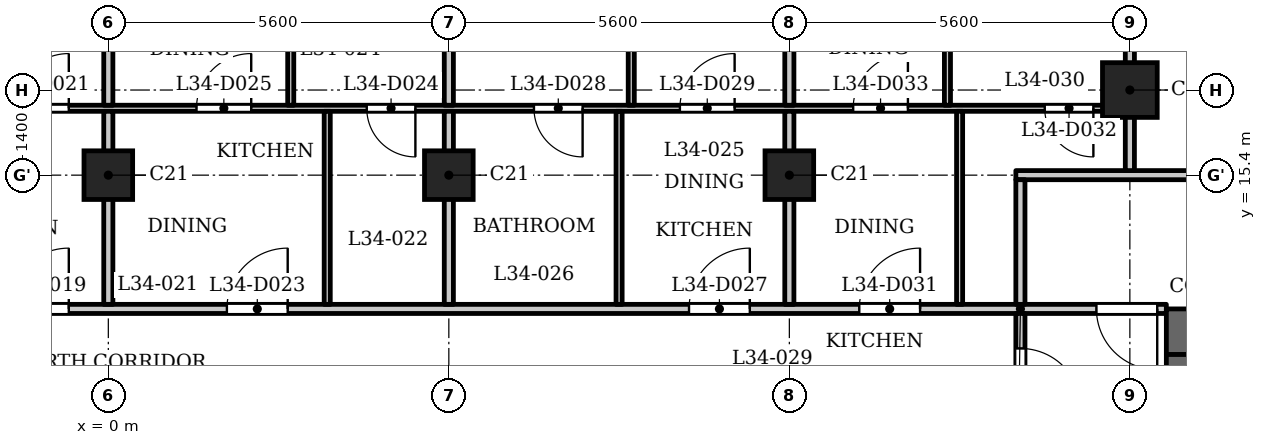
"""IFC4 building model, lengths in metres.
Left out: names, types, materials, properties, quantities, classifications, styles, units other than length and angle.
Written with IfcOpenShell. Run it as: python <this file> out.ifc"""

import sys

from ifc_helpers import new_model, si_unit, direction, frame, frame_2d, origin, origin_2d, place, context, subcontext, project, spatial, rectangle, extrude, element, fill, save


model = new_model("IFC4")
c1 = context("Model", 3, precision=1e-05, world=origin(), true_north=direction((0.0, 1.0)))
c2 = subcontext(c1, "Body", "Model", "MODEL_VIEW")
j1 = project(units=[si_unit("LENGTHUNIT", "METRE"), si_unit("PLANEANGLEUNIT", "RADIAN")], contexts=[c1])
p1 = place(None, origin())
s1 = spatial("IfcSite", under=j1, at=p1, CompositionType="ELEMENT")
p2 = place(p1, origin())
s2 = spatial("IfcBuilding", under=s1, at=p2, CompositionType="ELEMENT")
p3 = place(p2, frame((0.0, 0.0, 136.1)))
s3 = spatial("IfcBuildingStorey", under=s2, at=p3, CompositionType="ELEMENT", Elevation=136.1)
p4 = place(p3, frame((16.8, 16.8, 0.0), z_axis=(0.0, 0.0, 1.0), x_axis=(1.0, 0.0, 0.0)))
e1 = element("IfcColumn", 1, at=p4, inside=s3, PredefinedType="COLUMN", context=c2, shape_type="SweptSolid", body=[
    extrude(rectangle(XDim=0.9, YDim=0.9, at=origin_2d()), origin(), (0.0, 0.0, 1.0), 3.5),
])
for number, where, z_axis, x_axis in (
    (2, (0.0, 15.4, 0.0), (0.0, 0.0, 1.0), (1.0, 0.0, 0.0)),
    (3, (5.6, 15.4, 0.0), (0.0, 0.0, 1.0), (1.0, 0.0, 0.0)),
    (4, (11.2, 15.4, 0.0), (0.0, 0.0, 1.0), (1.0, 0.0, 0.0)),
):
    element("IfcColumn", number, at=place(p3, frame(where, z_axis=z_axis, x_axis=x_axis)), inside=s3, PredefinedType="COLUMN", context=c2, shape_type="SweptSolid", body=[
        extrude(rectangle(XDim=0.8, YDim=0.8, at=origin_2d()), origin(), (0.0, 0.0, 1.0), 3.5),
    ])
p5 = place(p3, frame((17.4, 12.825, 0.0), z_axis=(0.0, 0.0, 1.0), x_axis=(1.0, 0.0, 0.0)))
e5 = element("IfcWall", 5, at=p5, inside=s3, PredefinedType="SHEAR", context=c2, shape_type="SweptSolid", body=[
    extrude(rectangle(XDim=10.4, YDim=0.75, at=frame_2d((5.2, 0.0))), origin(), (0.0, 0.0, 1.0), 3.2),
])
p6 = place(p3, frame((17.6, -12.45, 0.0), z_axis=(0.0, 0.0, 1.0), x_axis=(0.0, 1.0, 0.0)))
e6 = element("IfcWall", 6, at=p6, inside=s3, PredefinedType="SHEAR", context=c2, shape_type="SweptSolid", body=[
    extrude(rectangle(XDim=24.9, YDim=0.4, at=frame_2d((12.45, 0.0))), origin(), (0.0, 0.0, 1.0), 3.2),
])
p7 = place(p6, frame((8.65, 0.0, 0.0)))
e7 = element("IfcOpeningElement", 7, at=p7, cuts=e6, PredefinedType="OPENING", context=c2, shape_type="SweptSolid", body=[
    extrude(rectangle(XDim=0.9, YDim=2.1, at=frame_2d((0.45, 1.05))), frame((0.0, 0.21, 0.0), z_axis=(0.0, -1.0, 0.0), x_axis=(1.0, 0.0, 0.0)), (0.0, 0.0, 1.0), 0.42),
])
p8 = place(p6, frame((15.6, 0.0, 0.0)))
e8 = element("IfcOpeningElement", 8, at=p8, cuts=e6, PredefinedType="OPENING", context=c2, shape_type="SweptSolid", body=[
    extrude(rectangle(XDim=1.1, YDim=2.1, at=frame_2d((0.55, 1.05))), frame((0.0, 0.21, 0.0), z_axis=(0.0, -1.0, 0.0), x_axis=(1.0, 0.0, 0.0)), (0.0, 0.0, 1.0), 0.42),
])
p9 = place(p6, frame((18.0, 0.0, 0.0)))
e9 = element("IfcOpeningElement", 9, at=p9, cuts=e6, PredefinedType="OPENING", context=c2, shape_type="SweptSolid", body=[
    extrude(rectangle(XDim=1.1, YDim=2.1, at=frame_2d((0.55, 1.05))), frame((0.0, 0.21, 0.0), z_axis=(0.0, -1.0, 0.0), x_axis=(1.0, 0.0, 0.0)), (0.0, 0.0, 1.0), 0.42),
])
p10 = place(p6, frame((23.025, 0.0, 0.0)))
e10 = element("IfcOpeningElement", 10, at=p10, cuts=e6, PredefinedType="OPENING", context=c2, shape_type="SweptSolid", body=[
    extrude(rectangle(XDim=1.1, YDim=2.1, at=frame_2d((0.55, 1.05))), frame((0.0, 0.21, 0.0), z_axis=(0.0, -1.0, 0.0), x_axis=(1.0, 0.0, 0.0)), (0.0, 0.0, 1.0), 0.42),
])
p11 = place(p6, frame((0.775, 0.0, 0.0)))
e11 = element("IfcOpeningElement", 11, at=p11, cuts=e6, PredefinedType="OPENING", context=c2, shape_type="SweptSolid", body=[
    extrude(rectangle(XDim=1.1, YDim=2.1, at=frame_2d((0.55, 1.05))), frame((0.0, 0.21, 0.0), z_axis=(0.0, -1.0, 0.0), x_axis=(1.0, 0.0, 0.0)), (0.0, 0.0, 1.0), 0.42),
])
p12 = place(p6, frame((12.925, 0.0, 0.0)))
e12 = element("IfcOpeningElement", 12, at=p12, cuts=e6, PredefinedType="OPENING", context=c2, shape_type="SweptSolid", body=[
    extrude(rectangle(XDim=1.8, YDim=2.1, at=frame_2d((0.9, 1.05))), frame((0.0, 0.21, 0.0), z_axis=(0.0, -1.0, 0.0), x_axis=(1.0, 0.0, 0.0)), (0.0, 0.0, 1.0), 0.42),
])
p13 = place(p3, frame((-17.4, 13.2, 0.0), z_axis=(0.0, 0.0, 1.0), x_axis=(1.0, 0.0, 0.0)))
e13 = element("IfcWall", 13, at=p13, inside=s3, PredefinedType="PARTITIONING", context=c2, shape_type="SweptSolid", body=[
    extrude(rectangle(XDim=34.8, YDim=0.15, at=frame_2d((17.4, 0.0))), origin(), (0.0, 0.0, 1.0), 3.2),
])
p14 = place(p13, frame((0.25, 0.0, 0.0)))
e14 = element("IfcOpeningElement", 14, at=p14, cuts=e13, PredefinedType="OPENING", context=c2, shape_type="SweptSolid", body=[
    extrude(rectangle(XDim=1.0, YDim=2.1, at=frame_2d((0.5, 1.05))), frame((0.0, 0.085, 0.0), z_axis=(0.0, -1.0, 0.0), x_axis=(1.0, 0.0, 0.0)), (0.0, 0.0, 1.0), 0.17),
])
p15 = place(p13, frame((33.65, 0.0, 0.0)))
e15 = element("IfcOpeningElement", 15, at=p15, cuts=e13, PredefinedType="OPENING", context=c2, shape_type="SweptSolid", body=[
    extrude(rectangle(XDim=1.0, YDim=2.1, at=frame_2d((0.5, 1.05))), frame((0.0, 0.085, 0.0), z_axis=(0.0, -1.0, 0.0), x_axis=(1.0, 0.0, 0.0)), (0.0, 0.0, 1.0), 0.17),
])
p16 = place(p13, frame((15.75, 0.0, 0.0)))
e16 = element("IfcOpeningElement", 16, at=p16, cuts=e13, PredefinedType="OPENING", context=c2, shape_type="SweptSolid", body=[
    extrude(rectangle(XDim=1.0, YDim=2.1, at=frame_2d((0.5, 1.05))), frame((0.0, 0.085, 0.0), z_axis=(0.0, -1.0, 0.0), x_axis=(1.0, 0.0, 0.0)), (0.0, 0.0, 1.0), 0.17),
])
p17 = place(p13, frame((19.35, 0.0, 0.0)))
e17 = element("IfcOpeningElement", 17, at=p17, cuts=e13, PredefinedType="OPENING", context=c2, shape_type="SweptSolid", body=[
    extrude(rectangle(XDim=1.0, YDim=2.1, at=frame_2d((0.5, 1.05))), frame((0.0, 0.085, 0.0), z_axis=(0.0, -1.0, 0.0), x_axis=(1.0, 0.0, 0.0)), (0.0, 0.0, 1.0), 0.17),
])
p18 = place(p13, frame((26.95, 0.0, 0.0)))
e18 = element("IfcOpeningElement", 18, at=p18, cuts=e13, PredefinedType="OPENING", context=c2, shape_type="SweptSolid", body=[
    extrude(rectangle(XDim=1.0, YDim=2.1, at=frame_2d((0.5, 1.05))), frame((0.0, 0.085, 0.0), z_axis=(0.0, -1.0, 0.0), x_axis=(1.0, 0.0, 0.0)), (0.0, 0.0, 1.0), 0.17),
])
p19 = place(p13, frame((29.75, 0.0, 0.0)))
e19 = element("IfcOpeningElement", 19, at=p19, cuts=e13, PredefinedType="OPENING", context=c2, shape_type="SweptSolid", body=[
    extrude(rectangle(XDim=1.0, YDim=2.1, at=frame_2d((0.5, 1.05))), frame((0.0, 0.085, 0.0), z_axis=(0.0, -1.0, 0.0), x_axis=(1.0, 0.0, 0.0)), (0.0, 0.0, 1.0), 0.17),
])
p20 = place(p3, frame((14.925, 15.4, 0.0), z_axis=(0.0, 0.0, 1.0), x_axis=(1.0, 0.0, 0.0)))
e20 = element("IfcWall", 20, at=p20, inside=s3, PredefinedType="PARTITIONING", context=c2, shape_type="SweptSolid", body=[
    extrude(rectangle(XDim=12.559, YDim=0.15, at=frame_2d((6.279, 0.0))), origin(), (0.0, 0.0, 1.0), 3.2),
])
p21 = place(p20, frame((5.825, 0.0, 0.0)))
e21 = element("IfcOpeningElement", 21, at=p21, cuts=e20, PredefinedType="OPENING", context=c2, shape_type="SweptSolid", body=[
    extrude(rectangle(XDim=1.0, YDim=2.1, at=frame_2d((0.5, 1.05))), frame((0.0, 0.085, 0.0), z_axis=(0.0, -1.0, 0.0), x_axis=(1.0, 0.0, 0.0)), (0.0, 0.0, 1.0), 0.17),
])
p22 = place(p3, frame((-16.725, 16.5, 0.0), z_axis=(0.0, 0.0, 1.0), x_axis=(1.0, 0.0, 0.0)))
e22 = element("IfcWall", 22, at=p22, inside=s3, PredefinedType="PARTITIONING", context=c2, shape_type="SweptSolid", body=[
    extrude(rectangle(XDim=33.45, YDim=0.1, at=frame_2d((16.725, 0.0))), origin(), (0.0, 0.0, 1.0), 3.2),
])
p23 = place(p22, frame((9.675, 0.0, 0.0)))
e23 = element("IfcOpeningElement", 23, at=p23, cuts=e22, PredefinedType="OPENING", context=c2, shape_type="SweptSolid", body=[
    extrude(rectangle(XDim=0.8, YDim=2.1, at=frame_2d((0.4, 1.05))), frame((0.0, 0.06, 0.0), z_axis=(0.0, -1.0, 0.0), x_axis=(1.0, 0.0, 0.0)), (0.0, 0.0, 1.0), 0.12),
])
p24 = place(p22, frame((3.975, 0.0, 0.0)))
e24 = element("IfcOpeningElement", 24, at=p24, cuts=e22, PredefinedType="OPENING", context=c2, shape_type="SweptSolid", body=[
    extrude(rectangle(XDim=0.9, YDim=2.1, at=frame_2d((0.45, 1.05))), frame((0.0, 0.06, 0.0), z_axis=(0.0, -1.0, 0.0), x_axis=(1.0, 0.0, 0.0)), (0.0, 0.0, 1.0), 0.12),
])
p25 = place(p22, frame((12.025, 0.0, 0.0)))
e25 = element("IfcOpeningElement", 25, at=p25, cuts=e22, PredefinedType="OPENING", context=c2, shape_type="SweptSolid", body=[
    extrude(rectangle(XDim=0.8, YDim=2.1, at=frame_2d((0.4, 1.05))), frame((0.0, 0.06, 0.0), z_axis=(0.0, -1.0, 0.0), x_axis=(1.0, 0.0, 0.0)), (0.0, 0.0, 1.0), 0.12),
])
p26 = place(p22, frame((15.175, 0.0, 0.0)))
e26 = element("IfcOpeningElement", 26, at=p26, cuts=e22, PredefinedType="OPENING", context=c2, shape_type="SweptSolid", body=[
    extrude(rectangle(XDim=0.9, YDim=2.1, at=frame_2d((0.45, 1.05))), frame((0.0, 0.06, 0.0), z_axis=(0.0, -1.0, 0.0), x_axis=(1.0, 0.0, 0.0)), (0.0, 0.0, 1.0), 0.12),
])
p27 = place(p22, frame((20.975, 0.0, 0.0)))
e27 = element("IfcOpeningElement", 27, at=p27, cuts=e22, PredefinedType="OPENING", context=c2, shape_type="SweptSolid", body=[
    extrude(rectangle(XDim=0.8, YDim=2.1, at=frame_2d((0.4, 1.05))), frame((0.0, 0.06, 0.0), z_axis=(0.0, -1.0, 0.0), x_axis=(1.0, 0.0, 0.0)), (0.0, 0.0, 1.0), 0.12),
])
p28 = place(p22, frame((18.175, 0.0, 0.0)))
e28 = element("IfcOpeningElement", 28, at=p28, cuts=e22, PredefinedType="OPENING", context=c2, shape_type="SweptSolid", body=[
    extrude(rectangle(XDim=0.9, YDim=2.1, at=frame_2d((0.45, 1.05))), frame((0.0, 0.06, 0.0), z_axis=(0.0, -1.0, 0.0), x_axis=(1.0, 0.0, 0.0)), (0.0, 0.0, 1.0), 0.12),
])
p29 = place(p22, frame((23.725, 0.0, 0.0)))
e29 = element("IfcOpeningElement", 29, at=p29, cuts=e22, PredefinedType="OPENING", context=c2, shape_type="SweptSolid", body=[
    extrude(rectangle(XDim=0.8, YDim=2.1, at=frame_2d((0.4, 1.05))), frame((0.0, 0.06, 0.0), z_axis=(0.0, -1.0, 0.0), x_axis=(1.0, 0.0, 0.0)), (0.0, 0.0, 1.0), 0.12),
])
p30 = place(p22, frame((26.125, 0.0, 0.0)))
e30 = element("IfcOpeningElement", 30, at=p30, cuts=e22, PredefinedType="OPENING", context=c2, shape_type="SweptSolid", body=[
    extrude(rectangle(XDim=0.9, YDim=2.1, at=frame_2d((0.45, 1.05))), frame((0.0, 0.06, 0.0), z_axis=(0.0, -1.0, 0.0), x_axis=(1.0, 0.0, 0.0)), (0.0, 0.0, 1.0), 0.12),
])
p31 = place(p22, frame((32.125, 0.0, 0.0)))
e31 = element("IfcOpeningElement", 31, at=p31, cuts=e22, PredefinedType="OPENING", context=c2, shape_type="SweptSolid", body=[
    extrude(rectangle(XDim=0.8, YDim=2.1, at=frame_2d((0.4, 1.05))), frame((0.0, 0.06, 0.0), z_axis=(0.0, -1.0, 0.0), x_axis=(1.0, 0.0, 0.0)), (0.0, 0.0, 1.0), 0.12),
])
p32 = place(p22, frame((28.975, 0.0, 0.0)))
e32 = element("IfcOpeningElement", 32, at=p32, cuts=e22, PredefinedType="OPENING", context=c2, shape_type="SweptSolid", body=[
    extrude(rectangle(XDim=0.9, YDim=2.1, at=frame_2d((0.45, 1.05))), frame((0.0, 0.06, 0.0), z_axis=(0.0, -1.0, 0.0), x_axis=(1.0, 0.0, 0.0)), (0.0, 0.0, 1.0), 0.12),
])
p33 = place(p3, frame((0.0, 13.275, 0.0), z_axis=(0.0, 0.0, 1.0), x_axis=(0.0, 1.0, 0.0)))
e33 = element("IfcWall", 33, at=p33, inside=s3, PredefinedType="PARTITIONING", context=c2, shape_type="SweptSolid", body=[
    extrude(rectangle(XDim=3.175, YDim=0.15, at=frame_2d((1.587, 0.0))), origin(), (0.0, 0.0, 1.0), 3.2),
])
p34 = place(p3, frame((0.0, 16.55, 0.0), z_axis=(0.0, 0.0, 1.0), x_axis=(0.0, 1.0, 0.0)))
e34 = element("IfcWall", 34, at=p34, inside=s3, PredefinedType="PARTITIONING", context=c2, shape_type="SweptSolid", body=[
    extrude(rectangle(XDim=6.38, YDim=0.15, at=frame_2d((3.19, 0.0))), origin(), (0.0, 0.0, 1.0), 3.2),
])
p35 = place(p3, frame((3.0, 16.55, 0.0), z_axis=(0.0, 0.0, 1.0), x_axis=(0.0, 1.0, 0.0)))
e35 = element("IfcWall", 35, at=p35, inside=s3, PredefinedType="PARTITIONING", context=c2, shape_type="SweptSolid", body=[
    extrude(rectangle(XDim=5.53, YDim=0.1, at=frame_2d((2.765, 0.0))), origin(), (0.0, 0.0, 1.0), 3.2),
])
p36 = place(p35, frame((4.35, 0.0, 0.0)))
e36 = element("IfcOpeningElement", 36, at=p36, cuts=e35, PredefinedType="OPENING", context=c2, shape_type="SweptSolid", body=[
    extrude(rectangle(XDim=0.9, YDim=2.1, at=frame_2d((0.45, 1.05))), frame((0.0, 0.06, 0.0), z_axis=(0.0, -1.0, 0.0), x_axis=(1.0, 0.0, 0.0)), (0.0, 0.0, 1.0), 0.12),
])
p37 = place(p3, frame((3.6, 13.275, 0.0), z_axis=(0.0, 0.0, 1.0), x_axis=(0.0, 1.0, 0.0)))
e37 = element("IfcWall", 37, at=p37, inside=s3, PredefinedType="PARTITIONING", context=c2, shape_type="SweptSolid", body=[
    extrude(rectangle(XDim=3.175, YDim=0.1, at=frame_2d((1.587, 0.0))), origin(), (0.0, 0.0, 1.0), 3.2),
])
p38 = place(p3, frame((5.6, 13.275, 0.0), z_axis=(0.0, 0.0, 1.0), x_axis=(0.0, 1.0, 0.0)))
e38 = element("IfcWall", 38, at=p38, inside=s3, PredefinedType="PARTITIONING", context=c2, shape_type="SweptSolid", body=[
    extrude(rectangle(XDim=3.175, YDim=0.15, at=frame_2d((1.587, 0.0))), origin(), (0.0, 0.0, 1.0), 3.2),
])
p39 = place(p3, frame((5.6, 16.55, 0.0), z_axis=(0.0, 0.0, 1.0), x_axis=(0.0, 1.0, 0.0)))
e39 = element("IfcWall", 39, at=p39, inside=s3, PredefinedType="PARTITIONING", context=c2, shape_type="SweptSolid", body=[
    extrude(rectangle(XDim=6.38, YDim=0.15, at=frame_2d((3.19, 0.0))), origin(), (0.0, 0.0, 1.0), 3.2),
])
p40 = place(p3, frame((8.4, 13.275, 0.0), z_axis=(0.0, 0.0, 1.0), x_axis=(0.0, 1.0, 0.0)))
e40 = element("IfcWall", 40, at=p40, inside=s3, PredefinedType="PARTITIONING", context=c2, shape_type="SweptSolid", body=[
    extrude(rectangle(XDim=3.175, YDim=0.1, at=frame_2d((1.587, 0.0))), origin(), (0.0, 0.0, 1.0), 3.2),
])
p41 = place(p3, frame((8.6, 16.55, 0.0), z_axis=(0.0, 0.0, 1.0), x_axis=(0.0, 1.0, 0.0)))
e41 = element("IfcWall", 41, at=p41, inside=s3, PredefinedType="PARTITIONING", context=c2, shape_type="SweptSolid", body=[
    extrude(rectangle(XDim=5.53, YDim=0.1, at=frame_2d((2.765, 0.0))), origin(), (0.0, 0.0, 1.0), 3.2),
])
p42 = place(p41, frame((1.21, 0.0, 0.0)))
e42 = element("IfcOpeningElement", 42, at=p42, cuts=e41, PredefinedType="OPENING", context=c2, shape_type="SweptSolid", body=[
    extrude(rectangle(XDim=0.9, YDim=2.1, at=frame_2d((0.45, 1.05))), frame((0.0, 0.06, 0.0), z_axis=(0.0, -1.0, 0.0), x_axis=(1.0, 0.0, 0.0)), (0.0, 0.0, 1.0), 0.12),
])
p43 = place(p3, frame((11.2, 13.275, 0.0), z_axis=(0.0, 0.0, 1.0), x_axis=(0.0, 1.0, 0.0)))
e43 = element("IfcWall", 43, at=p43, inside=s3, PredefinedType="PARTITIONING", context=c2, shape_type="SweptSolid", body=[
    extrude(rectangle(XDim=3.175, YDim=0.15, at=frame_2d((1.587, 0.0))), origin(), (0.0, 0.0, 1.0), 3.2),
])
p44 = place(p3, frame((11.2, 16.55, 0.0), z_axis=(0.0, 0.0, 1.0), x_axis=(0.0, 1.0, 0.0)))
e44 = element("IfcWall", 44, at=p44, inside=s3, PredefinedType="PARTITIONING", context=c2, shape_type="SweptSolid", body=[
    extrude(rectangle(XDim=6.38, YDim=0.15, at=frame_2d((3.19, 0.0))), origin(), (0.0, 0.0, 1.0), 3.2),
])
p45 = place(p3, frame((13.8, 16.55, 0.0), z_axis=(0.0, 0.0, 1.0), x_axis=(0.0, 1.0, 0.0)))
e45 = element("IfcWall", 45, at=p45, inside=s3, PredefinedType="PARTITIONING", context=c2, shape_type="SweptSolid", body=[
    extrude(rectangle(XDim=5.53, YDim=0.1, at=frame_2d((2.765, 0.0))), origin(), (0.0, 0.0, 1.0), 3.2),
])
p46 = place(p45, frame((4.35, 0.0, 0.0)))
e46 = element("IfcOpeningElement", 46, at=p46, cuts=e45, PredefinedType="OPENING", context=c2, shape_type="SweptSolid", body=[
    extrude(rectangle(XDim=0.9, YDim=2.1, at=frame_2d((0.45, 1.05))), frame((0.0, 0.06, 0.0), z_axis=(0.0, -1.0, 0.0), x_axis=(1.0, 0.0, 0.0)), (0.0, 0.0, 1.0), 0.12),
])
p47 = place(p3, frame((14.0, 13.275, 0.0), z_axis=(0.0, 0.0, 1.0), x_axis=(0.0, 1.0, 0.0)))
e47 = element("IfcWall", 47, at=p47, inside=s3, PredefinedType="PARTITIONING", context=c2, shape_type="SweptSolid", body=[
    extrude(rectangle(XDim=3.175, YDim=0.1, at=frame_2d((1.587, 0.0))), origin(), (0.0, 0.0, 1.0), 3.2),
])
p48 = place(p3, frame((15.0, 6.769, 0.0), z_axis=(0.0, 0.0, 1.0), x_axis=(0.0, 1.0, 0.0)))
e48 = element("IfcWall", 48, at=p48, inside=s3, PredefinedType="PARTITIONING", context=c2, shape_type="SweptSolid", body=[
    extrude(rectangle(XDim=6.356, YDim=0.15, at=frame_2d((3.178, 0.0))), origin(), (0.0, 0.0, 1.0), 3.2),
])
p49 = place(p48, frame((4.781, 0.0, 0.0)))
e49 = element("IfcOpeningElement", 49, at=p49, cuts=e48, PredefinedType="OPENING", context=c2, shape_type="SweptSolid", body=[
    extrude(rectangle(XDim=1.0, YDim=2.1, at=frame_2d((0.5, 1.05))), frame((0.0, 0.085, 0.0), z_axis=(0.0, -1.0, 0.0), x_axis=(1.0, 0.0, 0.0)), (0.0, 0.0, 1.0), 0.17),
])
p50 = place(p3, frame((15.0, 13.275, 0.0), z_axis=(0.0, 0.0, 1.0), x_axis=(0.0, 1.0, 0.0)))
e50 = element("IfcWall", 50, at=p50, inside=s3, PredefinedType="PARTITIONING", context=c2, shape_type="SweptSolid", body=[
    extrude(rectangle(XDim=2.05, YDim=0.15, at=frame_2d((1.025, 0.0))), origin(), (0.0, 0.0, 1.0), 3.2),
])
p51 = place(p3, frame((16.8, 15.475, 0.0), z_axis=(0.0, 0.0, 1.0), x_axis=(0.0, 1.0, 0.0)))
e51 = element("IfcWall", 51, at=p51, inside=s3, PredefinedType="PARTITIONING", context=c2, shape_type="SweptSolid", body=[
    extrude(rectangle(XDim=7.455, YDim=0.15, at=frame_2d((3.728, 0.0))), origin(), (0.0, 0.0, 1.0), 3.2),
])
p52 = place(p49, origin())
e52 = element("IfcDoor", 52, at=p52, inside=s3, OperationType="SINGLE_SWING_LEFT", PredefinedType="DOOR", context=c2, shape_type="SweptSolid", body=[
    extrude(rectangle(XDim=1.0, YDim=2.1, at=frame_2d((0.5, 1.05))), frame((0.0, 0.025, 0.0), z_axis=(0.0, -1.0, 0.0), x_axis=(1.0, 0.0, 0.0)), (0.0, 0.0, 1.0), 0.05),
])
fill(e49, e52)
p53 = place(p15, origin())
e53 = element("IfcDoor", 53, at=p53, inside=s3, OperationType="SINGLE_SWING_RIGHT", PredefinedType="DOOR", context=c2, shape_type="SweptSolid", body=[
    extrude(rectangle(XDim=1.0, YDim=2.1, at=frame_2d((0.5, 1.05))), frame((0.0, 0.025, 0.0), z_axis=(0.0, -1.0, 0.0), x_axis=(1.0, 0.0, 0.0)), (0.0, 0.0, 1.0), 0.05),
])
fill(e15, e53)
p54 = place(p16, origin())
e54 = element("IfcDoor", 54, at=p54, inside=s3, OperationType="SINGLE_SWING_LEFT", PredefinedType="DOOR", context=c2, shape_type="SweptSolid", body=[
    extrude(rectangle(XDim=1.0, YDim=2.1, at=frame_2d((0.5, 1.05))), frame((0.0, 0.025, 0.0), z_axis=(0.0, -1.0, 0.0), x_axis=(1.0, 0.0, 0.0)), (0.0, 0.0, 1.0), 0.05),
])
fill(e16, e54)
p55 = place(p26, origin())
e55 = element("IfcDoor", 55, at=p55, inside=s3, OperationType="SINGLE_SWING_LEFT", PredefinedType="DOOR", context=c2, shape_type="SweptSolid", body=[
    extrude(rectangle(XDim=0.9, YDim=2.1, at=frame_2d((0.45, 1.05))), frame((0.0, 0.025, 0.0), z_axis=(0.0, -1.0, 0.0), x_axis=(1.0, 0.0, 0.0)), (0.0, 0.0, 1.0), 0.05),
])
fill(e26, e55)
p56 = place(p17, origin())
e56 = element("IfcDoor", 56, at=p56, inside=s3, OperationType="SINGLE_SWING_LEFT", PredefinedType="DOOR", context=c2, shape_type="SweptSolid", body=[
    extrude(rectangle(XDim=1.0, YDim=2.1, at=frame_2d((0.5, 1.05))), frame((0.0, 0.025, 0.0), z_axis=(0.0, -1.0, 0.0), x_axis=(1.0, 0.0, 0.0)), (0.0, 0.0, 1.0), 0.05),
])
fill(e17, e56)
p57 = place(p27, origin())
e57 = element("IfcDoor", 57, at=p57, inside=s3, OperationType="SINGLE_SWING_RIGHT", PredefinedType="DOOR", context=c2, shape_type="SweptSolid", body=[
    extrude(rectangle(XDim=0.8, YDim=2.1, at=frame_2d((0.4, 1.05))), frame((0.0, 0.025, 0.0), z_axis=(0.0, -1.0, 0.0), x_axis=(1.0, 0.0, 0.0)), (0.0, 0.0, 1.0), 0.05),
])
fill(e27, e57)
p58 = place(p28, origin())
e58 = element("IfcDoor", 58, at=p58, inside=s3, OperationType="SINGLE_SWING_LEFT", PredefinedType="DOOR", context=c2, shape_type="SweptSolid", body=[
    extrude(rectangle(XDim=0.9, YDim=2.1, at=frame_2d((0.45, 1.05))), frame((0.0, 0.025, 0.0), z_axis=(0.0, -1.0, 0.0), x_axis=(1.0, 0.0, 0.0)), (0.0, 0.0, 1.0), 0.05),
])
fill(e28, e58)
p59 = place(p18, origin())
e59 = element("IfcDoor", 59, at=p59, inside=s3, OperationType="SINGLE_SWING_LEFT", PredefinedType="DOOR", context=c2, shape_type="SweptSolid", body=[
    extrude(rectangle(XDim=1.0, YDim=2.1, at=frame_2d((0.5, 1.05))), frame((0.0, 0.025, 0.0), z_axis=(0.0, -1.0, 0.0), x_axis=(1.0, 0.0, 0.0)), (0.0, 0.0, 1.0), 0.05),
])
fill(e18, e59)
p60 = place(p29, origin())
e60 = element("IfcDoor", 60, at=p60, inside=s3, OperationType="SINGLE_SWING_RIGHT", PredefinedType="DOOR", context=c2, shape_type="SweptSolid", body=[
    extrude(rectangle(XDim=0.8, YDim=2.1, at=frame_2d((0.4, 1.05))), frame((0.0, 0.025, 0.0), z_axis=(0.0, -1.0, 0.0), x_axis=(1.0, 0.0, 0.0)), (0.0, 0.0, 1.0), 0.05),
])
fill(e29, e60)
p61 = place(p30, origin())
e61 = element("IfcDoor", 61, at=p61, inside=s3, OperationType="SINGLE_SWING_LEFT", PredefinedType="DOOR", context=c2, shape_type="SweptSolid", body=[
    extrude(rectangle(XDim=0.9, YDim=2.1, at=frame_2d((0.45, 1.05))), frame((0.0, 0.025, 0.0), z_axis=(0.0, -1.0, 0.0), x_axis=(1.0, 0.0, 0.0)), (0.0, 0.0, 1.0), 0.05),
])
fill(e30, e61)
p62 = place(p19, origin())
e62 = element("IfcDoor", 62, at=p62, inside=s3, OperationType="SINGLE_SWING_LEFT", PredefinedType="DOOR", context=c2, shape_type="SweptSolid", body=[
    extrude(rectangle(XDim=1.0, YDim=2.1, at=frame_2d((0.5, 1.05))), frame((0.0, 0.025, 0.0), z_axis=(0.0, -1.0, 0.0), x_axis=(1.0, 0.0, 0.0)), (0.0, 0.0, 1.0), 0.05),
])
fill(e19, e62)
p63 = place(p31, origin())
e63 = element("IfcDoor", 63, at=p63, inside=s3, OperationType="SINGLE_SWING_RIGHT", PredefinedType="DOOR", context=c2, shape_type="SweptSolid", body=[
    extrude(rectangle(XDim=0.8, YDim=2.1, at=frame_2d((0.4, 1.05))), frame((0.0, 0.025, 0.0), z_axis=(0.0, -1.0, 0.0), x_axis=(1.0, 0.0, 0.0)), (0.0, 0.0, 1.0), 0.05),
])
fill(e31, e63)
p64 = place(p32, origin())
e64 = element("IfcDoor", 64, at=p64, inside=s3, OperationType="SINGLE_SWING_LEFT", PredefinedType="DOOR", context=c2, shape_type="SweptSolid", body=[
    extrude(rectangle(XDim=0.9, YDim=2.1, at=frame_2d((0.45, 1.05))), frame((0.0, 0.025, 0.0), z_axis=(0.0, -1.0, 0.0), x_axis=(1.0, 0.0, 0.0)), (0.0, 0.0, 1.0), 0.05),
])
fill(e32, e64)
save(model, sys.argv[1])
